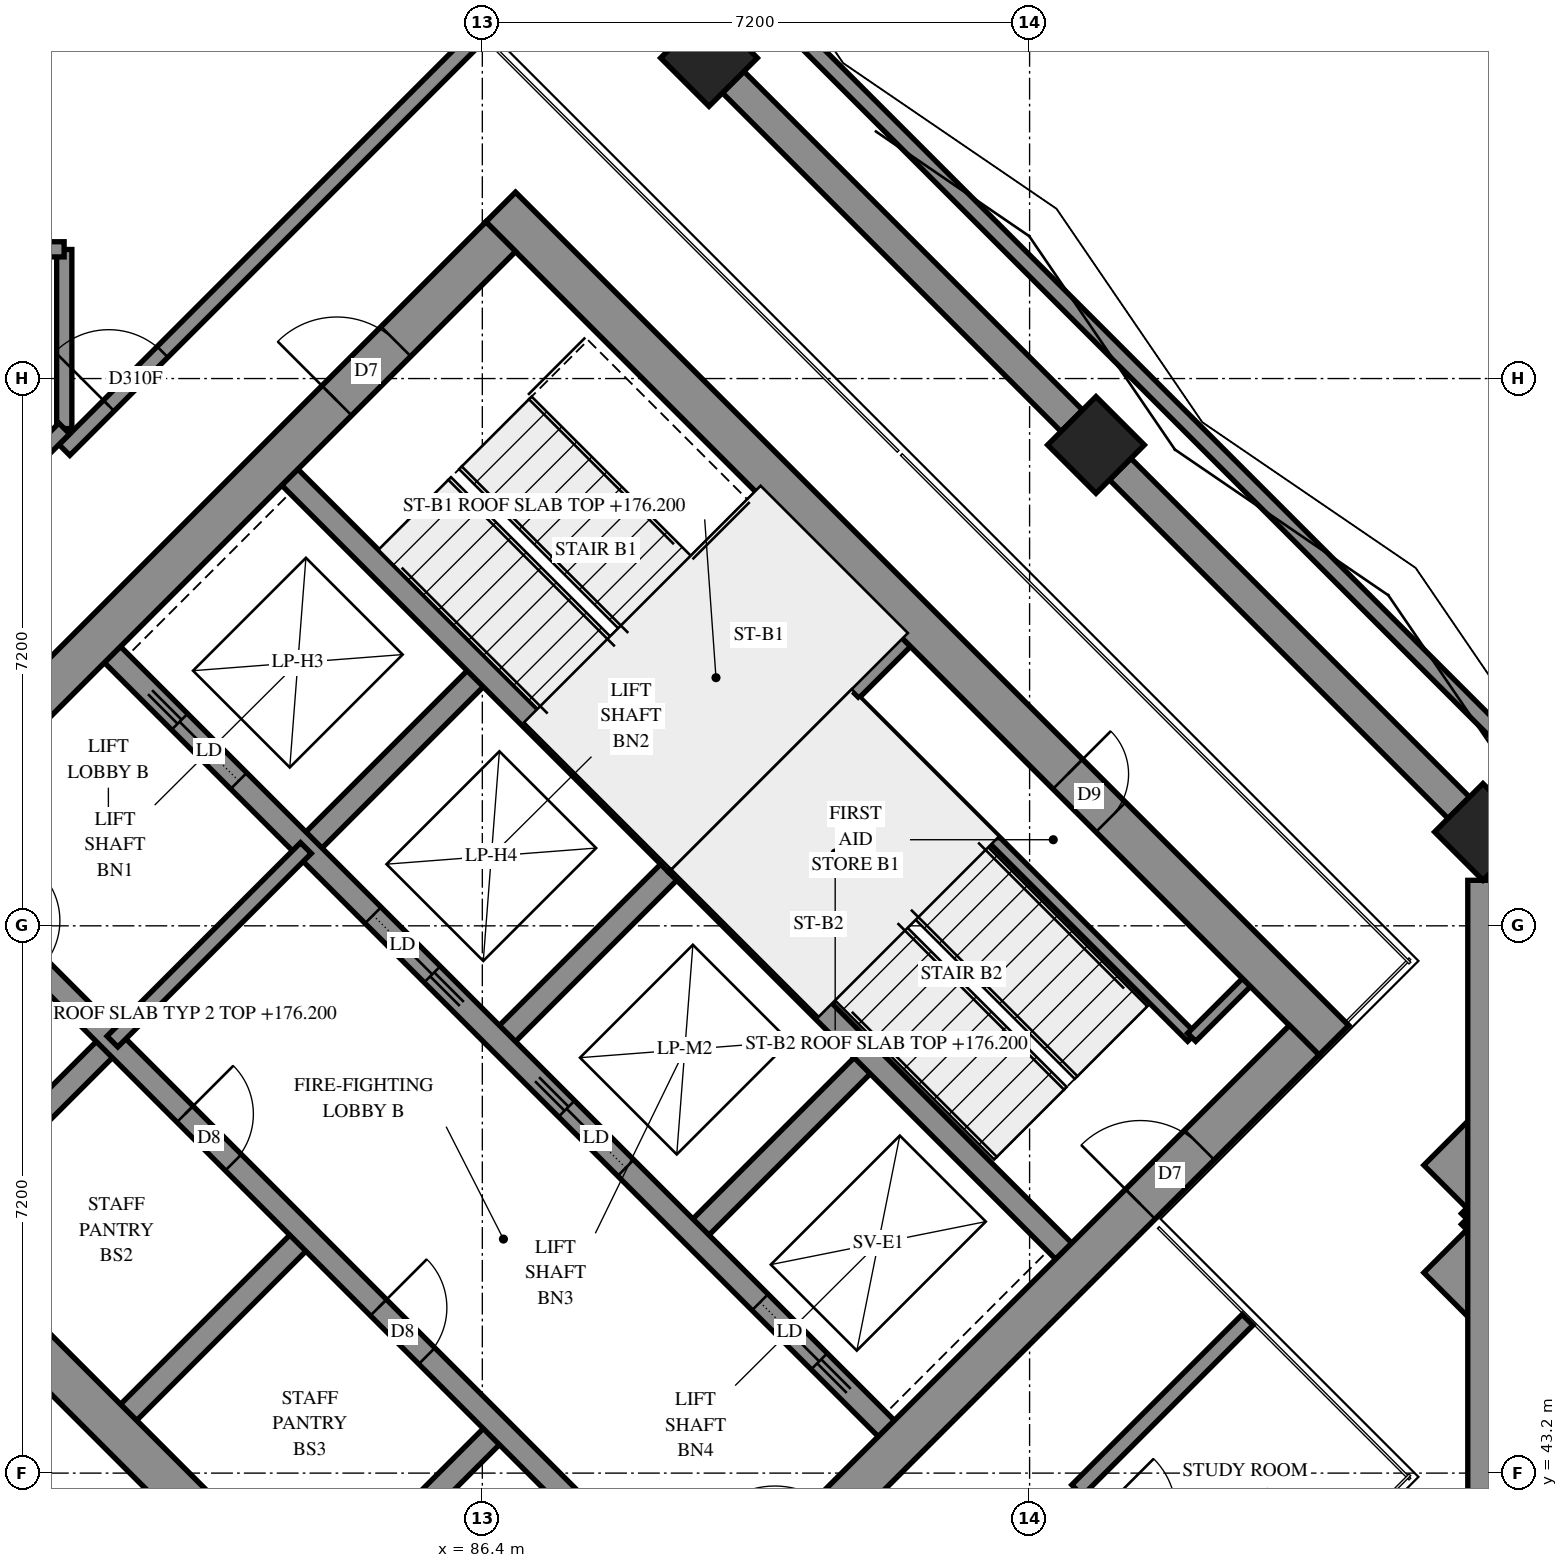
"""IFC4 building model, lengths in metres.
Left out: names, types, materials, properties, quantities, classifications, styles, units other than length and angle.
Written with IfcOpenShell. Run it as: python <this file> out.ifc"""

import sys

from ifc_helpers import new_model, si_unit, direction, frame, frame_2d, origin, origin_2d, place, context, subcontext, project, spatial, polyline, rectangle, outline, extrude, element, fill, save


model = new_model("IFC4")
c1 = context("Model", 3, precision=1e-05, world=origin(), true_north=direction((0.0, 1.0)))
c2 = subcontext(c1, "Body", "Model", "MODEL_VIEW")
j1 = project(units=[si_unit("LENGTHUNIT", "METRE"), si_unit("PLANEANGLEUNIT", "RADIAN")], contexts=[c1])
p1 = place(None, origin())
s1 = spatial("IfcSite", under=j1, at=p1, CompositionType="ELEMENT")
p2 = place(p1, origin())
s2 = spatial("IfcBuilding", under=s1, at=p2, CompositionType="ELEMENT")
p3 = place(p2, frame((0.0, 0.0, 176.2)))
s3 = spatial("IfcBuildingStorey", under=s2, at=p3, CompositionType="ELEMENT", Elevation=176.2)
for number, where, z_axis, x_axis in (
    (1, (89.382, 61.818, 0.0), (0.0, 0.0, 1.0), (0.707, -0.707, 0.0)),
    (2, (94.474, 56.727, 0.0), (0.0, 0.0, 1.0), (0.707, -0.707, 0.0)),
    (3, (99.565, 51.635, 0.0), (0.0, 0.0, 1.0), (0.707, -0.707, 0.0)),
):
    element("IfcColumn", number, at=place(p3, frame(where, z_axis=z_axis, x_axis=x_axis)), inside=s3, PredefinedType="COLUMN", context=c2, shape_type="SweptSolid", body=[
        extrude(rectangle(XDim=0.9, YDim=0.9, at=origin_2d()), origin(), (0.0, 0.0, 1.0), 3.9),
    ])
p4 = place(p3, frame((76.071, 49.284, -0.3), z_axis=(0.0, 0.0, 1.0), x_axis=(0.7071035554, -0.707110007, 0.0)))
e4 = element("IfcWall", 4, at=p4, inside=s3, PredefinedType="SHEAR", context=c2, shape_type="SweptSolid", body=[
    extrude(rectangle(XDim=15.5, YDim=0.55, at=frame_2d((7.75, 0.0))), origin(), (0.0, 0.0, 1.0), 3.5),
])
p5 = place(p3, frame((86.642, 59.855, -0.3), z_axis=(0.0, 0.0, 1.0), x_axis=(0.707110007, -0.7071035554, 0.0)))
e5 = element("IfcWall", 5, at=p5, inside=s3, PredefinedType="SHEAR", context=c2, shape_type="SweptSolid", body=[
    extrude(rectangle(XDim=15.5, YDim=0.55, at=frame_2d((7.75, 0.0))), origin(), (0.0, 0.0, 1.0), 3.5),
])
p6 = place(p5, frame((10.55, 0.0, 0.3)))
e6 = element("IfcOpeningElement", 6, at=p6, cuts=e5, PredefinedType="OPENING", context=c2, shape_type="SweptSolid", body=[
    extrude(rectangle(XDim=0.8, YDim=2.1, at=frame_2d((0.4, 1.05))), frame((0.0, 0.285, 0.0), z_axis=(0.0, -1.0, 0.0), x_axis=(1.0, 0.0, 0.0)), (0.0, 0.0, 1.0), 0.57),
])
p7 = place(p3, frame((76.46, 49.284, -0.3), z_axis=(0.0, 0.0, 1.0), x_axis=(0.7071067812, 0.7071067812, 0.0)))
e7 = element("IfcWall", 7, at=p7, inside=s3, PredefinedType="SHEAR", context=c2, shape_type="SweptSolid", body=[
    extrude(rectangle(XDim=14.4, YDim=0.55, at=frame_2d((7.2, 0.0))), origin(), (0.0, 0.0, 1.0), 3.5),
])
p8 = place(p7, frame((4.55, 0.0, 0.3)))
e8 = element("IfcOpeningElement", 8, at=p8, cuts=e7, PredefinedType="OPENING", context=c2, shape_type="SweptSolid", body=[
    extrude(rectangle(XDim=1.1, YDim=2.1, at=frame_2d((0.55, 1.05))), frame((0.0, 0.285, 0.0), z_axis=(0.0, -1.0, 0.0), x_axis=(1.0, 0.0, 0.0)), (0.0, 0.0, 1.0), 0.57),
])
p9 = place(p7, frame((11.35, 0.0, 0.3)))
e9 = element("IfcOpeningElement", 9, at=p9, cuts=e7, PredefinedType="OPENING", context=c2, shape_type="SweptSolid", body=[
    extrude(rectangle(XDim=1.1, YDim=2.1, at=frame_2d((0.55, 1.05))), frame((0.0, 0.285, 0.0), z_axis=(0.0, -1.0, 0.0), x_axis=(1.0, 0.0, 0.0)), (0.0, 0.0, 1.0), 0.57),
])
p10 = place(p3, frame((87.031, 38.713, -0.3), z_axis=(0.0, 0.0, 1.0), x_axis=(0.707103309, 0.7071102534, 0.0)))
e10 = element("IfcWall", 10, at=p10, inside=s3, PredefinedType="SHEAR", context=c2, shape_type="SweptSolid", body=[
    extrude(rectangle(XDim=14.4, YDim=0.55, at=frame_2d((7.2, 0.0))), origin(), (0.0, 0.0, 1.0), 3.5),
])
p11 = place(p10, frame((4.55, 0.0, 0.3)))
e11 = element("IfcOpeningElement", 11, at=p11, cuts=e10, PredefinedType="OPENING", context=c2, shape_type="SweptSolid", body=[
    extrude(rectangle(XDim=1.1, YDim=2.1, at=frame_2d((0.55, 1.05))), frame((0.0, 0.285, 0.0), z_axis=(0.0, -1.0, 0.0), x_axis=(1.0, 0.0, 0.0)), (0.0, 0.0, 1.0), 0.57),
])
p12 = place(p10, frame((11.35, 0.0, 0.3)))
e12 = element("IfcOpeningElement", 12, at=p12, cuts=e10, PredefinedType="OPENING", context=c2, shape_type="SweptSolid", body=[
    extrude(rectangle(XDim=1.1, YDim=2.1, at=frame_2d((0.55, 1.05))), frame((0.0, 0.285, 0.0), z_axis=(0.0, -1.0, 0.0), x_axis=(1.0, 0.0, 0.0)), (0.0, 0.0, 1.0), 0.57),
])
for number, where, z_axis, x_axis in (
    (13, (79.2, 46.544, 0.0), (0.0, 0.0, 1.0), (0.707, 0.707, 0.0)),
    (14, (84.079, 51.423, 0.0), (0.0, 0.0, 1.0), (0.707, 0.707, 0.0)),
):
    element("IfcWall", number, at=place(p3, frame(where, z_axis=z_axis, x_axis=x_axis)), inside=s3, PredefinedType="SOLIDWALL", context=c2, shape_type="SweptSolid", body=[
        extrude(rectangle(XDim=3.3, YDim=0.3, at=frame_2d((1.65, 0.0))), origin(), (0.0, 0.0, 1.0), 3.9),
    ])
p13 = place(p3, frame((81.746, 43.999, 0.0), z_axis=(0.0, 0.0, 1.0), x_axis=(0.7071067812, 0.7071067812, 0.0)))
e15 = element("IfcWall", 15, at=p13, inside=s3, PredefinedType="SOLIDWALL", context=c2, shape_type="SweptSolid", body=[
    extrude(rectangle(XDim=3.3, YDim=0.3, at=frame_2d((1.65, 0.0))), origin(), (0.0, 0.0, 1.0), 3.9),
])
p14 = place(p3, frame((86.625, 48.878, 0.0), z_axis=(0.0, 0.0, 1.0), x_axis=(0.7071067812, 0.7071067812, 0.0)))
e16 = element("IfcWall", 16, at=p14, inside=s3, PredefinedType="SOLIDWALL", context=c2, shape_type="SweptSolid", body=[
    extrude(rectangle(XDim=3.3, YDim=0.3, at=frame_2d((1.65, 0.0))), origin(), (0.0, 0.0, 1.0), 3.9),
])
p15 = place(p3, frame((84.291, 41.453, 0.0), z_axis=(0.0, 0.0, 1.0), x_axis=(0.7071067812, 0.7071067812, 0.0)))
e17 = element("IfcWall", 17, at=p15, inside=s3, PredefinedType="SOLIDWALL", context=c2, shape_type="SweptSolid", body=[
    extrude(rectangle(XDim=3.3, YDim=0.3, at=frame_2d((1.65, 0.0))), origin(), (0.0, 0.0, 1.0), 3.9),
])
p16 = place(p3, frame((89.17, 46.332, 0.0), z_axis=(0.0, 0.0, 1.0), x_axis=(0.7071067812, 0.7071067812, 0.0)))
e18 = element("IfcWall", 18, at=p16, inside=s3, PredefinedType="SOLIDWALL", context=c2, shape_type="SweptSolid", body=[
    extrude(rectangle(XDim=3.3, YDim=0.3, at=frame_2d((1.65, 0.0))), origin(), (0.0, 0.0, 1.0), 3.9),
])
p17 = place(p3, frame((78.988, 51.423, 0.0), z_axis=(0.0, 0.0, 1.0), x_axis=(0.7071067812, -0.7071067812, 0.0)))
e19 = element("IfcWall", 19, at=p17, inside=s3, PredefinedType="SOLIDWALL", context=c2, shape_type="SweptSolid", body=[
    extrude(rectangle(XDim=14.4, YDim=0.3, at=frame_2d((7.2, 0.0))), origin(), (0.0, 0.0, 1.0), 3.9),
])
p18 = place(p17, frame((1.35, 0.0, 0.0)))
e20 = element("IfcOpeningElement", 20, at=p18, cuts=e19, PredefinedType="OPENING", context=c2, shape_type="SweptSolid", body=[
    extrude(rectangle(XDim=0.9, YDim=2.1, at=frame_2d((0.45, 1.05))), frame((0.0, 0.16, 0.0), z_axis=(0.0, -1.0, 0.0), x_axis=(1.0, 0.0, 0.0)), (0.0, 0.0, 1.0), 0.32),
])
p19 = place(p17, frame((4.95, 0.0, 0.0)))
e21 = element("IfcOpeningElement", 21, at=p19, cuts=e19, PredefinedType="OPENING", context=c2, shape_type="SweptSolid", body=[
    extrude(rectangle(XDim=0.9, YDim=2.1, at=frame_2d((0.45, 1.05))), frame((0.0, 0.16, 0.0), z_axis=(0.0, -1.0, 0.0), x_axis=(1.0, 0.0, 0.0)), (0.0, 0.0, 1.0), 0.32),
])
p20 = place(p17, frame((8.55, 0.0, 0.0)))
e22 = element("IfcOpeningElement", 22, at=p20, cuts=e19, PredefinedType="OPENING", context=c2, shape_type="SweptSolid", body=[
    extrude(rectangle(XDim=0.9, YDim=2.1, at=frame_2d((0.45, 1.05))), frame((0.0, 0.16, 0.0), z_axis=(0.0, -1.0, 0.0), x_axis=(1.0, 0.0, 0.0)), (0.0, 0.0, 1.0), 0.32),
])
p21 = place(p17, frame((12.05, 0.0, 0.0)))
e23 = element("IfcOpeningElement", 23, at=p21, cuts=e19, PredefinedType="OPENING", context=c2, shape_type="SweptSolid", body=[
    extrude(rectangle(XDim=1.1, YDim=2.1, at=frame_2d((0.55, 1.05))), frame((0.0, 0.16, 0.0), z_axis=(0.0, -1.0, 0.0), x_axis=(1.0, 0.0, 0.0)), (0.0, 0.0, 1.0), 0.32),
])
p22 = place(p3, frame((81.534, 53.969, 0.0), z_axis=(0.0, 0.0, 1.0), x_axis=(0.707103309, -0.7071102534, 0.0)))
e24 = element("IfcWall", 24, at=p22, inside=s3, PredefinedType="SOLIDWALL", context=c2, shape_type="SweptSolid", body=[
    extrude(rectangle(XDim=14.4, YDim=0.3, at=frame_2d((7.2, 0.0))), origin(), (0.0, 0.0, 1.0), 3.9),
])
p23 = place(p22, frame((1.25, 0.0, 0.0)))
e25 = element("IfcOpeningElement", 25, at=p23, cuts=e24, PredefinedType="OPENING", context=c2, shape_type="SweptSolid", body=[
    extrude(rectangle(XDim=1.1, YDim=2.1, at=frame_2d((0.55, 1.05))), frame((0.0, 0.16, 0.0), z_axis=(0.0, -1.0, 0.0), x_axis=(1.0, 0.0, 0.0)), (0.0, 0.0, 1.0), 0.32),
])
p24 = place(p22, frame((4.85, 0.0, 0.0)))
e26 = element("IfcOpeningElement", 26, at=p24, cuts=e24, PredefinedType="OPENING", context=c2, shape_type="SweptSolid", body=[
    extrude(rectangle(XDim=1.1, YDim=2.1, at=frame_2d((0.55, 1.05))), frame((0.0, 0.16, 0.0), z_axis=(0.0, -1.0, 0.0), x_axis=(1.0, 0.0, 0.0)), (0.0, 0.0, 1.0), 0.32),
])
p25 = place(p22, frame((8.45, 0.0, 0.0)))
e27 = element("IfcOpeningElement", 27, at=p25, cuts=e24, PredefinedType="OPENING", context=c2, shape_type="SweptSolid", body=[
    extrude(rectangle(XDim=1.1, YDim=2.1, at=frame_2d((0.55, 1.05))), frame((0.0, 0.16, 0.0), z_axis=(0.0, -1.0, 0.0), x_axis=(1.0, 0.0, 0.0)), (0.0, 0.0, 1.0), 0.32),
])
p26 = place(p22, frame((12.05, 0.0, 0.0)))
e28 = element("IfcOpeningElement", 28, at=p26, cuts=e24, PredefinedType="OPENING", context=c2, shape_type="SweptSolid", body=[
    extrude(rectangle(XDim=1.1, YDim=2.1, at=frame_2d((0.55, 1.05))), frame((0.0, 0.16, 0.0), z_axis=(0.0, -1.0, 0.0), x_axis=(1.0, 0.0, 0.0)), (0.0, 0.0, 1.0), 0.32),
])
for number, where, z_axis, x_axis in (
    (29, (83.867, 56.302, 0.0), (0.0, 0.0, 1.0), (0.707, -0.707, 0.0)),
    (30, (88.958, 51.211, 0.0), (0.0, 0.0, 1.0), (0.707, -0.707, 0.0)),
):
    element("IfcWall", number, at=place(p3, frame(where, z_axis=z_axis, x_axis=x_axis)), inside=s3, PredefinedType="SOLIDWALL", context=c2, shape_type="SweptSolid", body=[
        extrude(rectangle(XDim=7.2, YDim=0.3, at=frame_2d((3.6, 0.0))), origin(), (0.0, 0.0, 1.0), 3.9),
    ])
p27 = place(p3, frame((88.958, 51.211, 0.0), z_axis=(0.0, 0.0, 1.0), x_axis=(0.7071067812, 0.7071067812, 0.0)))
e31 = element("IfcWall", 31, at=p27, inside=s3, PredefinedType="SOLIDWALL", context=c2, shape_type="SweptSolid", body=[
    extrude(rectangle(XDim=4.2, YDim=0.3, at=frame_2d((2.1, 0.0))), origin(), (0.0, 0.0, 1.0), 3.9),
])
p28 = place(p3, frame((101.791, 43.399, 0.0), z_axis=(0.0, 0.0, 1.0), x_axis=(-0.7070807946, 0.7071327668, 0.0)))
e32 = element("IfcWall", 32, at=p28, inside=s3, PredefinedType="SOLIDWALL", context=c2, shape_type="SweptSolid", body=[
    extrude(rectangle(XDim=3.848, YDim=0.8, at=frame_2d((1.924, 0.0))), origin(), (0.0, 0.0, 1.0), 0.65),
])
p29 = place(p3, frame((99.07, 46.968, 0.0), z_axis=(0.0, 0.0, 1.0), x_axis=(0.7071067812, 0.7071067812, 0.0)))
e33 = element("IfcWall", 33, at=p29, inside=s3, PredefinedType="SOLIDWALL", context=c2, shape_type="SweptSolid", body=[
    extrude(rectangle(XDim=4.548, YDim=0.8, at=frame_2d((2.274, 0.0))), origin(), (0.0, 0.0, 1.0), 0.65),
])
p30 = place(p3, frame((102.747, 43.15, 0.0), z_axis=(0.0, 0.0, 1.0), x_axis=(-0.7071067812, 0.7071067812, 0.0)))
e34 = element("IfcWall", 34, at=p30, inside=s3, PredefinedType="SOLIDWALL", context=c2, shape_type="SweptSolid", body=[
    extrude(outline(polyline([(-0.1, -0.1), (4.7, -0.1), (4.9, 0.1), (0.1, 0.1), (-0.1, -0.1)])), origin(), (0.0, 0.0, 1.0), 4.2),
])
p31 = place(p3, frame((99.353, 46.544, 0.0), z_axis=(0.0, 0.0, 1.0), x_axis=(0.7071171977, 0.7070963646, 0.0)))
e35 = element("IfcWall", 35, at=p31, inside=s3, PredefinedType="SOLIDWALL", context=c2, shape_type="SweptSolid", body=[
    extrude(outline(polyline([(0.1, -0.1), (4.9, -0.1), (4.7, 0.1), (-0.1, 0.1), (0.1, -0.1)])), origin(), (0.0, 0.0, 1.0), 4.2),
])
p32 = place(p3, frame((102.747, 49.938, 0.0), z_axis=(0.0, 0.0, 1.0), x_axis=(-0.7071083109, 0.7071052514, 0.0)))
e36 = element("IfcWall", 36, at=p32, inside=s3, PredefinedType="SOLIDWALL", context=c2, shape_type="SweptSolid", body=[
    extrude(outline(polyline([(-0.1, -0.1), (32.726, -0.1), (32.644, 0.1), (0.1, 0.1), (-0.1, -0.1)])), origin(), (0.0, 0.0, 1.0), 4.2),
])
p33 = place(p3, frame((89.382, 29.786, 0.0), z_axis=(0.0, 0.0, 1.0), x_axis=(0.7071094267, 0.7071041357, 0.0)))
e37 = element("IfcWall", 37, at=p33, inside=s3, PredefinedType="SOLIDWALL", context=c2, shape_type="SweptSolid", body=[
    extrude(outline(polyline([(-0.1, -0.1), (19.0, -0.1), (18.8, 0.1), (0.1, 0.1), (-0.1, -0.1)])), origin(), (0.0, 0.0, 1.0), 4.2),
])
p34 = place(p3, frame((91.313, 53.354, 0.0), z_axis=(0.0, 0.0, 1.0), x_axis=(0.7071147811, -0.7070987812, 0.0)))
e38 = element("IfcWall", 38, at=p34, inside=s3, PredefinedType="PARTITIONING", context=c2, shape_type="SweptSolid", body=[
    extrude(rectangle(XDim=6.25, YDim=0.15, at=frame_2d((3.125, 0.0))), origin(), (0.0, 0.0, 1.0), 3.9),
])
p35 = place(p3, frame((95.732, 48.934, 0.0), z_axis=(0.0, 0.0, 1.0), x_axis=(0.7071067812, 0.7071067812, 0.0)))
e39 = element("IfcWall", 39, at=p35, inside=s3, PredefinedType="PARTITIONING", context=c2, shape_type="SweptSolid", body=[
    extrude(rectangle(XDim=1.02, YDim=0.15, at=frame_2d((0.51, 0.0))), origin(), (0.0, 0.0, 1.0), 3.9),
])
p36 = place(p3, frame((81.534, 48.878, 0.0), z_axis=(0.0, 0.0, 1.0), x_axis=(0.707092892, 0.7071206701, 0.0)))
e40 = element("IfcWall", 40, at=p36, inside=s3, PredefinedType="PARTITIONING", context=c2, shape_type="SweptSolid", body=[
    extrude(rectangle(XDim=3.6, YDim=0.2, at=frame_2d((1.8, 0.0))), origin(), (0.0, 0.0, 1.0), 3.9),
])
p37 = place(p3, frame((80.902, 56.66, 0.0), z_axis=(0.0, 0.0, 1.0), x_axis=(0.7069771439, 0.7072363947, 0.0)))
e41 = element("IfcWall", 41, at=p37, inside=s3, PredefinedType="PARTITIONING", context=c2, shape_type="SweptSolid", body=[
    extrude(rectangle(XDim=7.715, YDim=0.2, at=frame_2d((3.857, 0.0))), origin(), (0.0, 0.0, 1.0), 3.9),
])
p38 = place(p37, frame((0.825, 0.0, 0.0)))
e42 = element("IfcOpeningElement", 42, at=p38, cuts=e41, PredefinedType="OPENING", context=c2, shape_type="SweptSolid", body=[
    extrude(rectangle(XDim=1.0, YDim=2.1, at=frame_2d((0.5, 1.05))), frame((0.0, 0.11, 0.0), z_axis=(0.0, -1.0, 0.0), x_axis=(1.0, 0.0, 0.0)), (0.0, 0.0, 1.0), 0.22),
])
p39 = place(p3, frame((94.225, 42.974, 0.0), z_axis=(0.0, 0.0, 1.0), x_axis=(0.7071067812, 0.7071067812, 0.0)))
e43 = element("IfcWall", 43, at=p39, inside=s3, PredefinedType="PARTITIONING", context=c2, shape_type="SweptSolid", body=[
    extrude(rectangle(XDim=3.171, YDim=0.2, at=frame_2d((1.585, 0.0))), origin(), (0.0, 0.0, 1.0), 3.9),
])
p40 = place(p3, frame((80.9, 56.942, 0.0), z_axis=(0.0, 0.0, 1.0), x_axis=(0.0, 1.0, 0.0)))
e44 = element("IfcWall", 44, at=p40, inside=s3, PredefinedType="PARTITIONING", context=c2, shape_type="SweptSolid", body=[
    extrude(rectangle(XDim=2.356, YDim=0.2, at=frame_2d((1.178, 0.0))), origin(), (0.0, 0.0, 1.0), 3.9),
])
p41 = place(p3, frame((79.801, 55.845, 0.0), z_axis=(0.0, 0.0, 1.0), x_axis=(0.7071067812, 0.7071067812, 0.0)))
e45 = element("IfcWall", 45, at=p41, inside=s3, PredefinedType="PARTITIONING", context=c2, shape_type="SweptSolid", body=[
    extrude(rectangle(XDim=1.553, YDim=0.2, at=frame_2d((0.776, 0.0))), origin(), (0.0, 0.0, 1.0), 3.9),
])
p42 = place(p3, frame((79.8, 59.3, 0.0), z_axis=(0.0, 0.0, 1.0), x_axis=(1.0, 0.0, 0.0)))
e46 = element("IfcWall", 46, at=p42, inside=s3, PredefinedType="PARTITIONING", context=c2, shape_type="SweptSolid", body=[
    extrude(rectangle(XDim=1.098, YDim=0.2, at=frame_2d((0.549, 0.0))), origin(), (0.0, 0.0, 1.0), 3.9),
])
p43 = place(p6, origin())
e47 = element("IfcDoor", 47, at=p43, inside=s3, OperationType="SINGLE_SWING_RIGHT", PredefinedType="DOOR", context=c2, shape_type="SweptSolid", body=[
    extrude(rectangle(XDim=0.8, YDim=2.1, at=frame_2d((0.4, 1.05))), frame((0.0, 0.025, 0.0), z_axis=(0.0, -1.0, 0.0), x_axis=(1.0, 0.0, 0.0)), (0.0, 0.0, 1.0), 0.05),
])
fill(e6, e47)
p44 = place(p9, origin())
e48 = element("IfcDoor", 48, at=p44, inside=s3, OperationType="SINGLE_SWING_LEFT", PredefinedType="DOOR", context=c2, shape_type="SweptSolid", body=[
    extrude(rectangle(XDim=1.1, YDim=2.1, at=frame_2d((0.55, 1.05))), frame((0.0, 0.025, 0.0), z_axis=(0.0, -1.0, 0.0), x_axis=(1.0, 0.0, 0.0)), (0.0, 0.0, 1.0), 0.05),
])
fill(e9, e48)
p45 = place(p12, origin())
e49 = element("IfcDoor", 49, at=p45, inside=s3, OperationType="SINGLE_SWING_RIGHT", PredefinedType="DOOR", context=c2, shape_type="SweptSolid", body=[
    extrude(rectangle(XDim=1.1, YDim=2.1, at=frame_2d((0.55, 1.05))), frame((0.0, 0.025, 0.0), z_axis=(0.0, -1.0, 0.0), x_axis=(1.0, 0.0, 0.0)), (0.0, 0.0, 1.0), 0.05),
])
fill(e12, e49)
p46 = place(p19, origin())
e50 = element("IfcDoor", 50, at=p46, inside=s3, OperationType="SINGLE_SWING_LEFT", PredefinedType="DOOR", context=c2, shape_type="SweptSolid", body=[
    extrude(rectangle(XDim=0.9, YDim=2.1, at=frame_2d((0.45, 1.05))), frame((0.0, 0.025, 0.0), z_axis=(0.0, -1.0, 0.0), x_axis=(1.0, 0.0, 0.0)), (0.0, 0.0, 1.0), 0.05),
])
fill(e21, e50)
p47 = place(p20, origin())
e51 = element("IfcDoor", 51, at=p47, inside=s3, OperationType="SINGLE_SWING_LEFT", PredefinedType="DOOR", context=c2, shape_type="SweptSolid", body=[
    extrude(rectangle(XDim=0.9, YDim=2.1, at=frame_2d((0.45, 1.05))), frame((0.0, 0.025, 0.0), z_axis=(0.0, -1.0, 0.0), x_axis=(1.0, 0.0, 0.0)), (0.0, 0.0, 1.0), 0.05),
])
fill(e22, e51)
p48 = place(p23, origin())
e52 = element("IfcDoor", 52, at=p48, inside=s3, OperationType="SLIDING_TO_LEFT", PredefinedType="DOOR", context=c2, shape_type="SweptSolid", body=[
    extrude(rectangle(XDim=1.1, YDim=2.1, at=frame_2d((0.55, 1.05))), frame((0.0, 0.025, 0.0), z_axis=(0.0, -1.0, 0.0), x_axis=(1.0, 0.0, 0.0)), (0.0, 0.0, 1.0), 0.05),
])
fill(e25, e52)
p49 = place(p24, origin())
e53 = element("IfcDoor", 53, at=p49, inside=s3, OperationType="SLIDING_TO_RIGHT", PredefinedType="DOOR", context=c2, shape_type="SweptSolid", body=[
    extrude(rectangle(XDim=1.1, YDim=2.1, at=frame_2d((0.55, 1.05))), frame((0.0, 0.025, 0.0), z_axis=(0.0, -1.0, 0.0), x_axis=(1.0, 0.0, 0.0)), (0.0, 0.0, 1.0), 0.05),
])
fill(e26, e53)
p50 = place(p25, origin())
e54 = element("IfcDoor", 54, at=p50, inside=s3, OperationType="SLIDING_TO_LEFT", PredefinedType="DOOR", context=c2, shape_type="SweptSolid", body=[
    extrude(rectangle(XDim=1.1, YDim=2.1, at=frame_2d((0.55, 1.05))), frame((0.0, 0.025, 0.0), z_axis=(0.0, -1.0, 0.0), x_axis=(1.0, 0.0, 0.0)), (0.0, 0.0, 1.0), 0.05),
])
fill(e27, e54)
p51 = place(p26, origin())
e55 = element("IfcDoor", 55, at=p51, inside=s3, OperationType="SLIDING_TO_RIGHT", PredefinedType="DOOR", context=c2, shape_type="SweptSolid", body=[
    extrude(rectangle(XDim=1.1, YDim=2.1, at=frame_2d((0.55, 1.05))), frame((0.0, 0.025, 0.0), z_axis=(0.0, -1.0, 0.0), x_axis=(1.0, 0.0, 0.0)), (0.0, 0.0, 1.0), 0.05),
])
fill(e28, e55)
p52 = place(p38, origin())
e56 = element("IfcDoor", 56, at=p52, inside=s3, OperationType="SINGLE_SWING_RIGHT", PredefinedType="DOOR", context=c2, shape_type="SweptSolid", body=[
    extrude(rectangle(XDim=1.0, YDim=2.1, at=frame_2d((0.5, 1.05))), frame((0.0, 0.025, 0.0), z_axis=(0.0, -1.0, 0.0), x_axis=(1.0, 0.0, 0.0)), (0.0, 0.0, 1.0), 0.05),
])
fill(e42, e56)
save(model, sys.argv[1])
